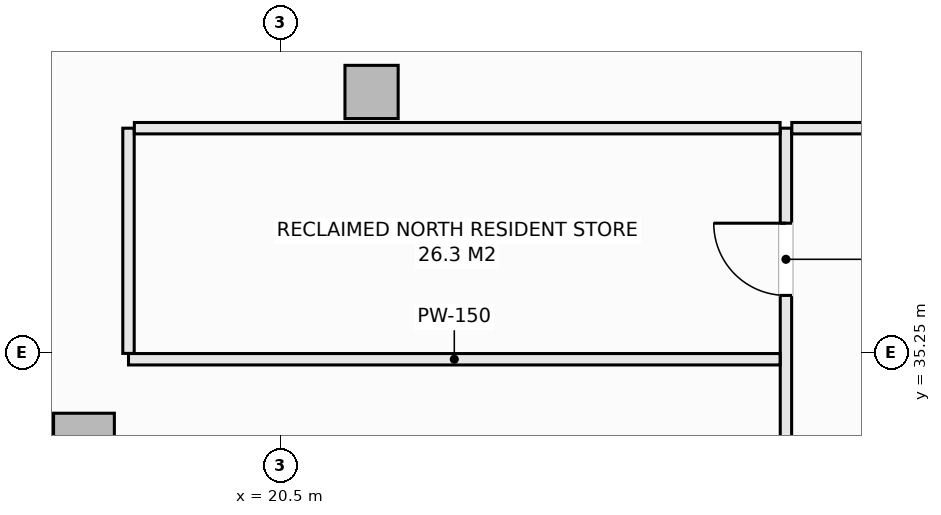
"""IFC4 building model, lengths in metres.
Left out: names, types, materials, properties, quantities, classifications, styles, units other than length and angle.
Written with IfcOpenShell. Run it as: python <this file> out.ifc"""

import sys

from ifc_helpers import new_model, si_unit, direction, frame, frame_2d, origin, origin_2d, place, context, subcontext, project, spatial, rectangle, extrude, element, fill, save


model = new_model("IFC4")
c1 = context("Model", 3, precision=1e-05, world=origin(), true_north=direction((0.0, 1.0)))
c2 = subcontext(c1, "Body", "Model", "MODEL_VIEW")
j1 = project(units=[si_unit("LENGTHUNIT", "METRE"), si_unit("PLANEANGLEUNIT", "RADIAN")], contexts=[c1])
p1 = place(None, origin())
s1 = spatial("IfcSite", under=j1, at=p1, CompositionType="ELEMENT")
p2 = place(p1, origin())
s2 = spatial("IfcBuilding", under=s1, at=p2, CompositionType="ELEMENT")
p3 = place(p2, frame((0.0, 0.0, 245.9)))
s3 = spatial("IfcBuildingStorey", under=s2, at=p3, CompositionType="ELEMENT", Elevation=245.9)
p4 = place(p3, frame((21.698, 38.677, -0.27), z_axis=(0.0, 0.0, 1.0), x_axis=(1.0, 0.0, 0.0)))
e1 = element("IfcColumn", 1, at=p4, inside=s3, PredefinedType="COLUMN", context=c2, shape_type="SweptSolid", body=[
    extrude(rectangle(XDim=0.7, YDim=0.7, at=origin_2d()), origin(), (0.0, 0.0, 1.0), 3.3),
])
p5 = place(p3, frame((17.914, 34.05, -0.27), z_axis=(0.0, 0.0, 1.0), x_axis=(1.0, 0.0, 0.0)))
e2 = element("IfcColumn", 2, at=p5, inside=s3, PredefinedType="PILASTER", context=c2, shape_type="SweptSolid", body=[
    extrude(rectangle(XDim=0.8, YDim=0.8, at=origin_2d()), origin(), (0.0, 0.0, 1.0), 3.3),
])
p6 = place(p3, frame((27.15, 34.002, 0.0), z_axis=(0.0, 0.0, 1.0), x_axis=(0.0, 1.0, 0.0)))
e3 = element("IfcWall", 3, at=p6, inside=s3, PredefinedType="PARTITIONING", context=c2, shape_type="SweptSolid", body=[
    extrude(rectangle(XDim=4.198, YDim=0.15, at=frame_2d((2.099, 0.0))), origin(), (0.0, 0.0, 1.0), 3.03),
])
p7 = place(p6, frame((1.998, 0.0, 0.0)))
e4 = element("IfcOpeningElement", 4, at=p7, cuts=e3, PredefinedType="OPENING", context=c2, shape_type="SweptSolid", body=[
    extrude(rectangle(XDim=0.95, YDim=2.1, at=frame_2d((0.475, 1.05))), frame((0.0, 0.085, 0.0), z_axis=(0.0, -1.0, 0.0), x_axis=(1.0, 0.0, 0.0)), (0.0, 0.0, 1.0), 0.17),
])
p8 = place(p3, frame((18.5, 35.16, 0.0), z_axis=(0.0, 0.0, 1.0), x_axis=(1.0, 0.0, 0.0)))
e5 = element("IfcWall", 5, at=p8, inside=s3, PredefinedType="PARTITIONING", context=c2, shape_type="SweptSolid", body=[
    extrude(rectangle(XDim=8.573, YDim=0.15, at=frame_2d((4.287, 0.0))), origin(), (0.0, 0.0, 1.0), 3.03),
])
p9 = place(p3, frame((18.5, 35.237, 0.0), z_axis=(0.0, 0.0, 1.0), x_axis=(0.0, 1.0, 0.0)))
e6 = element("IfcWall", 6, at=p9, inside=s3, PredefinedType="PARTITIONING", context=c2, shape_type="SweptSolid", body=[
    extrude(rectangle(XDim=2.963, YDim=0.15, at=frame_2d((1.481, 0.0))), origin(), (0.0, 0.0, 1.0), 3.03),
])
p10 = place(p3, frame((18.577, 38.2, 0.0), z_axis=(0.0, 0.0, 1.0), x_axis=(1.0, 0.0, 0.0)))
e7 = element("IfcWall", 7, at=p10, inside=s3, PredefinedType="PARTITIONING", context=c2, shape_type="SweptSolid", body=[
    extrude(rectangle(XDim=8.496, YDim=0.15, at=frame_2d((4.248, 0.0))), origin(), (0.0, 0.0, 1.0), 3.03),
])
p11 = place(p3, frame((27.227, 38.2, 0.0), z_axis=(0.0, 0.0, 1.0), x_axis=(1.0, 0.0, 0.0)))
e8 = element("IfcWall", 8, at=p11, inside=s3, PredefinedType="PARTITIONING", context=c2, shape_type="SweptSolid", body=[
    extrude(rectangle(XDim=2.733, YDim=0.15, at=frame_2d((1.366, 0.0))), origin(), (0.0, 0.0, 1.0), 3.03),
])
p12 = place(p7, origin())
e9 = element("IfcDoor", 9, at=p12, inside=s3, OperationType="SINGLE_SWING_RIGHT", PredefinedType="DOOR", context=c2, shape_type="SweptSolid", body=[
    extrude(rectangle(XDim=0.95, YDim=2.1, at=frame_2d((0.475, 1.05))), frame((0.0, 0.025, 0.0), z_axis=(0.0, -1.0, 0.0), x_axis=(1.0, 0.0, 0.0)), (0.0, 0.0, 1.0), 0.05),
])
fill(e4, e9)
save(model, sys.argv[1])
